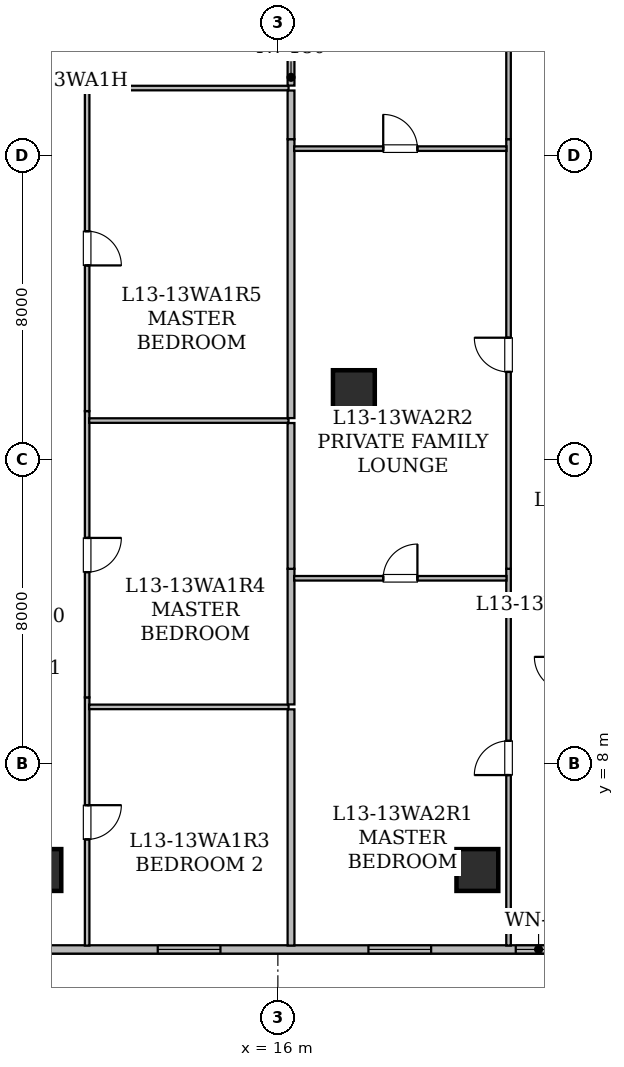
"""IFC4 building model, lengths in metres.
Left out: names, types, materials, properties, quantities, classifications, styles, units other than length and angle.
Written with IfcOpenShell. Run it as: python <this file> out.ifc"""

import sys

from ifc_helpers import new_model, si_unit, direction, frame, frame_2d, origin, origin_2d, place, context, subcontext, project, spatial, rectangle, hollow_rectangle, extrude, element, fill, save


model = new_model("IFC4")
c1 = context("Model", 3, precision=1e-05, world=origin(), true_north=direction((0.0, 1.0)))
c2 = subcontext(c1, "Body", "Model", "MODEL_VIEW")
j1 = project(units=[si_unit("LENGTHUNIT", "METRE"), si_unit("PLANEANGLEUNIT", "RADIAN")], contexts=[c1])
p1 = place(None, origin())
s1 = spatial("IfcSite", under=j1, at=p1, CompositionType="ELEMENT")
p2 = place(p1, origin())
s2 = spatial("IfcBuilding", under=s1, at=p2, CompositionType="ELEMENT")
p3 = place(p2, frame((0.0, 0.0, 55.2)))
s3 = spatial("IfcBuildingStorey", under=s2, at=p3, CompositionType="ELEMENT", Elevation=55.2)
for number, where, z_axis, x_axis in (
    (1, (9.75, 5.2, 0.0), (0.0, 0.0, 1.0), (1.0, 0.0, 0.0)),
    (2, (21.25, 5.2, 0.0), (0.0, 0.0, 1.0), (1.0, 0.0, 0.0)),
    (3, (18.0, 17.8, 0.0), (0.0, 0.0, 1.0), (1.0, 0.0, 0.0)),
):
    element("IfcColumn", number, at=place(p3, frame(where, z_axis=z_axis, x_axis=x_axis)), inside=s3, PredefinedType="COLUMN", context=c2, shape_type="SweptSolid", body=[
        extrude(hollow_rectangle(XDim=1.1, YDim=1.1, WallThickness=0.055, at=origin_2d()), origin(), (0.0, 0.0, 1.0), 3.65),
    ])
p4 = place(p3, frame((45.683, 3.11, 0.0), z_axis=(0.0, 0.0, 1.0), x_axis=(-1.0, 0.0, 0.0)))
e4 = element("IfcWall", 4, at=p4, inside=s3, PredefinedType="STANDARD", context=c2, shape_type="SweptSolid", body=[
    extrude(rectangle(XDim=37.368, YDim=0.22, at=frame_2d((18.684, 0.0))), origin(), (0.0, 0.0, 1.0), 3.43),
])
p5 = place(p4, frame((31.194, 0.0, 0.85)))
e5 = element("IfcOpeningElement", 5, at=p5, cuts=e4, PredefinedType="OPENING", context=c2, shape_type="SweptSolid", body=[
    extrude(rectangle(XDim=1.65, YDim=1.55, at=frame_2d((0.825, 0.775))), frame((0.0, 0.12, 0.0), z_axis=(0.0, -1.0, 0.0), x_axis=(1.0, 0.0, 0.0)), (0.0, 0.0, 1.0), 0.24),
])
p6 = place(p4, frame((19.615, 0.0, 0.85)))
e6 = element("IfcOpeningElement", 6, at=p6, cuts=e4, PredefinedType="OPENING", context=c2, shape_type="SweptSolid", body=[
    extrude(rectangle(XDim=1.65, YDim=1.55, at=frame_2d((0.825, 0.775))), frame((0.0, 0.12, 0.0), z_axis=(0.0, -1.0, 0.0), x_axis=(1.0, 0.0, 0.0)), (0.0, 0.0, 1.0), 0.24),
])
p7 = place(p4, frame((22.223, 0.0, 0.8)))
e7 = element("IfcOpeningElement", 7, at=p7, cuts=e4, PredefinedType="OPENING", context=c2, shape_type="SweptSolid", body=[
    extrude(rectangle(XDim=1.2, YDim=1.5, at=frame_2d((0.6, 0.75))), frame((0.0, 0.12, 0.0), z_axis=(0.0, -1.0, 0.0), x_axis=(1.0, 0.0, 0.0)), (0.0, 0.0, 1.0), 0.24),
])
p8 = place(p4, frame((25.65, 0.0, 0.85)))
e8 = element("IfcOpeningElement", 8, at=p8, cuts=e4, PredefinedType="OPENING", context=c2, shape_type="SweptSolid", body=[
    extrude(rectangle(XDim=1.65, YDim=1.55, at=frame_2d((0.825, 0.775))), frame((0.0, 0.12, 0.0), z_axis=(0.0, -1.0, 0.0), x_axis=(1.0, 0.0, 0.0)), (0.0, 0.0, 1.0), 0.24),
])
p9 = place(p4, frame((10.983, 0.0, 0.8)))
e9 = element("IfcOpeningElement", 9, at=p9, cuts=e4, PredefinedType="OPENING", context=c2, shape_type="SweptSolid", body=[
    extrude(rectangle(XDim=1.2, YDim=1.5, at=frame_2d((0.6, 0.75))), frame((0.0, 0.12, 0.0), z_axis=(0.0, -1.0, 0.0), x_axis=(1.0, 0.0, 0.0)), (0.0, 0.0, 1.0), 0.24),
])
p10 = place(p4, frame((14.783, 0.0, 0.85)))
e10 = element("IfcOpeningElement", 10, at=p10, cuts=e4, PredefinedType="OPENING", context=c2, shape_type="SweptSolid", body=[
    extrude(rectangle(XDim=1.65, YDim=1.55, at=frame_2d((0.825, 0.775))), frame((0.0, 0.12, 0.0), z_axis=(0.0, -1.0, 0.0), x_axis=(1.0, 0.0, 0.0)), (0.0, 0.0, 1.0), 0.24),
])
p11 = place(p4, frame((6.733, 0.0, 0.85)))
e11 = element("IfcOpeningElement", 11, at=p11, cuts=e4, PredefinedType="OPENING", context=c2, shape_type="SweptSolid", body=[
    extrude(rectangle(XDim=1.65, YDim=1.55, at=frame_2d((0.825, 0.775))), frame((0.0, 0.12, 0.0), z_axis=(0.0, -1.0, 0.0), x_axis=(1.0, 0.0, 0.0)), (0.0, 0.0, 1.0), 0.24),
])
p12 = place(p4, frame((1.738, 0.0, 0.85)))
e12 = element("IfcOpeningElement", 12, at=p12, cuts=e4, PredefinedType="OPENING", context=c2, shape_type="SweptSolid", body=[
    extrude(rectangle(XDim=1.65, YDim=1.55, at=frame_2d((0.825, 0.775))), frame((0.0, 0.12, 0.0), z_axis=(0.0, -1.0, 0.0), x_axis=(1.0, 0.0, 0.0)), (0.0, 0.0, 1.0), 0.24),
])
p13 = place(p3, frame((10.981, 9.742, 0.0), z_axis=(0.0, 0.0, 1.0), x_axis=(0.0, -1.0, 0.0)))
e13 = element("IfcWall", 13, at=p13, inside=s3, PredefinedType="PARTITIONING", context=c2, shape_type="SweptSolid", body=[
    extrude(rectangle(XDim=6.53, YDim=0.12, at=frame_2d((3.265, 0.0))), origin(), (0.0, 0.0, 1.0), 2.647),
])
p14 = place(p13, frame((2.836, 0.0, 0.0)))
e14 = element("IfcOpeningElement", 14, at=p14, cuts=e13, PredefinedType="OPENING", context=c2, shape_type="SweptSolid", body=[
    extrude(rectangle(XDim=0.9, YDim=2.1, at=frame_2d((0.45, 1.05))), frame((0.0, 0.07, 0.0), z_axis=(0.0, -1.0, 0.0), x_axis=(1.0, 0.0, 0.0)), (0.0, 0.0, 1.0), 0.14),
])
p15 = place(p3, frame((10.981, 17.275, 0.0), z_axis=(0.0, 0.0, 1.0), x_axis=(0.0, -1.0, 0.0)))
e15 = element("IfcWall", 15, at=p15, inside=s3, PredefinedType="PARTITIONING", context=c2, shape_type="SweptSolid", body=[
    extrude(rectangle(XDim=7.533, YDim=0.12, at=frame_2d((3.767, 0.0))), origin(), (0.0, 0.0, 1.0), 2.647),
])
p16 = place(p15, frame((3.337, 0.0, 0.0)))
e16 = element("IfcOpeningElement", 16, at=p16, cuts=e15, PredefinedType="OPENING", context=c2, shape_type="SweptSolid", body=[
    extrude(rectangle(XDim=0.9, YDim=2.1, at=frame_2d((0.45, 1.05))), frame((0.0, 0.07, 0.0), z_axis=(0.0, -1.0, 0.0), x_axis=(1.0, 0.0, 0.0)), (0.0, 0.0, 1.0), 0.14),
])
p17 = place(p3, frame((16.281, 25.775, 0.0), z_axis=(0.0, 0.0, 1.0), x_axis=(-1.0, 0.0, 0.0)))
e17 = element("IfcWall", 17, at=p17, inside=s3, PredefinedType="PARTITIONING", context=c2, shape_type="SweptSolid", body=[
    extrude(rectangle(XDim=5.365, YDim=0.12, at=frame_2d((2.683, 0.0))), origin(), (0.0, 0.0, 1.0), 3.43),
])
p18 = place(p3, frame((10.981, 25.84, 0.0), z_axis=(0.0, 0.0, 1.0), x_axis=(0.0, -1.0, 0.0)))
e18 = element("IfcWall", 18, at=p18, inside=s3, PredefinedType="PARTITIONING", context=c2, shape_type="SweptSolid", body=[
    extrude(rectangle(XDim=8.565, YDim=0.12, at=frame_2d((4.283, 0.0))), origin(), (0.0, 0.0, 1.0), 2.647),
])
p19 = place(p18, frame((3.832, 0.0, 0.0)))
e19 = element("IfcOpeningElement", 19, at=p19, cuts=e18, PredefinedType="OPENING", context=c2, shape_type="SweptSolid", body=[
    extrude(rectangle(XDim=0.9, YDim=2.1, at=frame_2d((0.45, 1.05))), frame((0.0, 0.07, 0.0), z_axis=(0.0, -1.0, 0.0), x_axis=(1.0, 0.0, 0.0)), (0.0, 0.0, 1.0), 0.14),
])
p20 = place(p3, frame((16.346, 27.29, 0.0), z_axis=(0.0, 0.0, 1.0), x_axis=(0.0, -1.0, 0.0)))
e20 = element("IfcWall", 20, at=p20, inside=s3, PredefinedType="STANDARD", context=c2, shape_type="SweptSolid", body=[
    extrude(rectangle(XDim=1.45, YDim=0.18, at=frame_2d((0.725, 0.0))), origin(), (0.0, 0.0, 1.0), 3.43),
])
p21 = place(p3, frame((11.035, 9.492, 0.0), z_axis=(0.0, 0.0, 1.0), x_axis=(1.0, 0.0, 0.0)))
e21 = element("IfcWall", 21, at=p21, inside=s3, PredefinedType="PARTITIONING", context=c2, shape_type="SweptSolid", body=[
    extrude(rectangle(XDim=5.246, YDim=0.12, at=frame_2d((2.623, 0.0))), origin(), (0.0, 0.0, 1.0), 2.647),
])
p22 = place(p3, frame((16.346, 9.427, 0.0), z_axis=(0.0, 0.0, 1.0), x_axis=(0.0, -1.0, 0.0)))
e22 = element("IfcWall", 22, at=p22, inside=s3, PredefinedType="STANDARD", context=c2, shape_type="SweptSolid", body=[
    extrude(rectangle(XDim=6.215, YDim=0.18, at=frame_2d((3.107, 0.0))), origin(), (0.0, 0.0, 1.0), 2.803),
])
p23 = place(p3, frame((11.035, 17.026, 0.0), z_axis=(0.0, 0.0, 1.0), x_axis=(1.0, 0.0, 0.0)))
e23 = element("IfcWall", 23, at=p23, inside=s3, PredefinedType="PARTITIONING", context=c2, shape_type="SweptSolid", body=[
    extrude(rectangle(XDim=5.246, YDim=0.12, at=frame_2d((2.623, 0.0))), origin(), (0.0, 0.0, 1.0), 2.647),
])
p24 = place(p3, frame((16.346, 13.125, 0.0), z_axis=(0.0, 0.0, 1.0), x_axis=(0.0, -1.0, 0.0)))
e24 = element("IfcWall", 24, at=p24, inside=s3, PredefinedType="STANDARD", context=c2, shape_type="SweptSolid", body=[
    extrude(rectangle(XDim=3.568, YDim=0.18, at=frame_2d((1.784, 0.0))), origin(), (0.0, 0.0, 1.0), 3.43),
])
p25 = place(p3, frame((16.346, 16.961, 0.0), z_axis=(0.0, 0.0, 1.0), x_axis=(0.0, -1.0, 0.0)))
e25 = element("IfcWall", 25, at=p25, inside=s3, PredefinedType="STANDARD", context=c2, shape_type="SweptSolid", body=[
    extrude(rectangle(XDim=3.836, YDim=0.18, at=frame_2d((1.918, 0.0))), origin(), (0.0, 0.0, 1.0), 2.647),
])
p26 = place(p3, frame((16.346, 24.43, 0.0), z_axis=(0.0, 0.0, 1.0), x_axis=(0.0, -1.0, 0.0)))
e26 = element("IfcWall", 26, at=p26, inside=s3, PredefinedType="STANDARD", context=c2, shape_type="SweptSolid", body=[
    extrude(rectangle(XDim=7.339, YDim=0.18, at=frame_2d((3.669, 0.0))), origin(), (0.0, 0.0, 1.0), 2.647),
])
p27 = place(p3, frame((16.346, 25.71, 0.0), z_axis=(0.0, 0.0, 1.0), x_axis=(0.0, -1.0, 0.0)))
e27 = element("IfcWall", 27, at=p27, inside=s3, PredefinedType="STANDARD", context=c2, shape_type="SweptSolid", body=[
    extrude(rectangle(XDim=1.28, YDim=0.18, at=frame_2d((0.64, 0.0))), origin(), (0.0, 0.0, 1.0), 2.957),
])
p28 = place(p3, frame((22.07, 3.212, 0.0), z_axis=(0.0, 0.0, 1.0), x_axis=(0.0, 1.0, 0.0)))
e28 = element("IfcWall", 28, at=p28, inside=s3, PredefinedType="PARTITIONING", context=c2, shape_type="SweptSolid", body=[
    extrude(rectangle(XDim=9.913, YDim=0.12, at=frame_2d((4.957, 0.0))), origin(), (0.0, 0.0, 1.0), 2.803),
])
p29 = place(p28, frame((4.486, 0.0, 0.0)))
e29 = element("IfcOpeningElement", 29, at=p29, cuts=e28, PredefinedType="OPENING", context=c2, shape_type="SweptSolid", body=[
    extrude(rectangle(XDim=0.9, YDim=2.1, at=frame_2d((0.45, 1.05))), frame((0.0, 0.07, 0.0), z_axis=(0.0, -1.0, 0.0), x_axis=(1.0, 0.0, 0.0)), (0.0, 0.0, 1.0), 0.14),
])
p30 = place(p3, frame((22.07, 13.125, 0.0), z_axis=(0.0, 0.0, 1.0), x_axis=(0.0, 1.0, 0.0)))
e30 = element("IfcWall", 30, at=p30, inside=s3, PredefinedType="PARTITIONING", context=c2, shape_type="SweptSolid", body=[
    extrude(rectangle(XDim=11.305, YDim=0.12, at=frame_2d((5.652, 0.0))), origin(), (0.0, 0.0, 1.0), 2.647),
])
p31 = place(p30, frame((5.181, 0.0, 0.0)))
e31 = element("IfcOpeningElement", 31, at=p31, cuts=e30, PredefinedType="OPENING", context=c2, shape_type="SweptSolid", body=[
    extrude(rectangle(XDim=0.9, YDim=2.1, at=frame_2d((0.45, 1.05))), frame((0.0, 0.07, 0.0), z_axis=(0.0, -1.0, 0.0), x_axis=(1.0, 0.0, 0.0)), (0.0, 0.0, 1.0), 0.14),
])
p32 = place(p3, frame((22.07, 24.43, 0.0), z_axis=(0.0, 0.0, 1.0), x_axis=(0.0, 1.0, 0.0)))
e32 = element("IfcWall", 32, at=p32, inside=s3, PredefinedType="PARTITIONING", context=c2, shape_type="SweptSolid", body=[
    extrude(rectangle(XDim=6.438, YDim=0.12, at=frame_2d((3.219, 0.0))), origin(), (0.0, 0.0, 1.0), 2.957),
])
p33 = place(p32, frame((2.769, 0.0, 0.0)))
e33 = element("IfcOpeningElement", 33, at=p33, cuts=e32, PredefinedType="OPENING", context=c2, shape_type="SweptSolid", body=[
    extrude(rectangle(XDim=0.9, YDim=2.1, at=frame_2d((0.45, 1.05))), frame((0.0, 0.07, 0.0), z_axis=(0.0, -1.0, 0.0), x_axis=(1.0, 0.0, 0.0)), (0.0, 0.0, 1.0), 0.14),
])
p34 = place(p3, frame((16.428, 12.876, 0.0), z_axis=(0.0, 0.0, 1.0), x_axis=(1.0, 0.0, 0.0)))
e34 = element("IfcWall", 34, at=p34, inside=s3, PredefinedType="PARTITIONING", context=c2, shape_type="SweptSolid", body=[
    extrude(rectangle(XDim=5.588, YDim=0.12, at=frame_2d((2.794, 0.0))), origin(), (0.0, 0.0, 1.0), 2.647),
])
p35 = place(p34, frame((2.344, 0.0, 0.0)))
e35 = element("IfcOpeningElement", 35, at=p35, cuts=e34, PredefinedType="OPENING", context=c2, shape_type="SweptSolid", body=[
    extrude(rectangle(XDim=0.9, YDim=2.1, at=frame_2d((0.45, 1.05))), frame((0.0, 0.07, 0.0), z_axis=(0.0, -1.0, 0.0), x_axis=(1.0, 0.0, 0.0)), (0.0, 0.0, 1.0), 0.14),
])
p36 = place(p3, frame((16.428, 24.181, 0.0), z_axis=(0.0, 0.0, 1.0), x_axis=(1.0, 0.0, 0.0)))
e36 = element("IfcWall", 36, at=p36, inside=s3, PredefinedType="PARTITIONING", context=c2, shape_type="SweptSolid", body=[
    extrude(rectangle(XDim=5.588, YDim=0.12, at=frame_2d((2.794, 0.0))), origin(), (0.0, 0.0, 1.0), 2.647),
])
p37 = place(p36, frame((2.344, 0.0, 0.0)))
e37 = element("IfcOpeningElement", 37, at=p37, cuts=e36, PredefinedType="OPENING", context=c2, shape_type="SweptSolid", body=[
    extrude(rectangle(XDim=0.9, YDim=2.1, at=frame_2d((0.45, 1.05))), frame((0.0, 0.07, 0.0), z_axis=(0.0, -1.0, 0.0), x_axis=(1.0, 0.0, 0.0)), (0.0, 0.0, 1.0), 0.14),
])
p38 = place(p5, origin())
e38 = element("IfcWindow", 38, at=p38, inside=s3, PartitioningType="SINGLE_PANEL", PredefinedType="WINDOW", context=c2, shape_type="SweptSolid", body=[
    extrude(rectangle(XDim=1.65, YDim=1.55, at=frame_2d((0.825, 0.775))), frame((0.0, 0.03, 0.0), z_axis=(0.0, -1.0, 0.0), x_axis=(1.0, 0.0, 0.0)), (0.0, 0.0, 1.0), 0.06),
])
fill(e5, e38)
p39 = place(p7, origin())
e39 = element("IfcWindow", 39, at=p39, inside=s3, PartitioningType="SINGLE_PANEL", PredefinedType="WINDOW", context=c2, shape_type="SweptSolid", body=[
    extrude(rectangle(XDim=1.2, YDim=1.5, at=frame_2d((0.6, 0.75))), frame((0.0, 0.03, 0.0), z_axis=(0.0, -1.0, 0.0), x_axis=(1.0, 0.0, 0.0)), (0.0, 0.0, 1.0), 0.06),
])
fill(e7, e39)
p40 = place(p8, origin())
e40 = element("IfcWindow", 40, at=p40, inside=s3, PartitioningType="SINGLE_PANEL", PredefinedType="WINDOW", context=c2, shape_type="SweptSolid", body=[
    extrude(rectangle(XDim=1.65, YDim=1.55, at=frame_2d((0.825, 0.775))), frame((0.0, 0.03, 0.0), z_axis=(0.0, -1.0, 0.0), x_axis=(1.0, 0.0, 0.0)), (0.0, 0.0, 1.0), 0.06),
])
fill(e8, e40)
p41 = place(p14, origin())
e41 = element("IfcDoor", 41, at=p41, inside=s3, OperationType="SINGLE_SWING_LEFT", PredefinedType="DOOR", context=c2, shape_type="SweptSolid", body=[
    extrude(rectangle(XDim=0.9, YDim=2.1, at=frame_2d((0.45, 1.05))), frame((0.0, 0.025, 0.0), z_axis=(0.0, -1.0, 0.0), x_axis=(1.0, 0.0, 0.0)), (0.0, 0.0, 1.0), 0.05),
])
fill(e14, e41)
p42 = place(p16, origin())
e42 = element("IfcDoor", 42, at=p42, inside=s3, OperationType="SINGLE_SWING_LEFT", PredefinedType="DOOR", context=c2, shape_type="SweptSolid", body=[
    extrude(rectangle(XDim=0.9, YDim=2.1, at=frame_2d((0.45, 1.05))), frame((0.0, 0.025, 0.0), z_axis=(0.0, -1.0, 0.0), x_axis=(1.0, 0.0, 0.0)), (0.0, 0.0, 1.0), 0.05),
])
fill(e16, e42)
p43 = place(p19, origin())
e43 = element("IfcDoor", 43, at=p43, inside=s3, OperationType="SINGLE_SWING_RIGHT", PredefinedType="DOOR", context=c2, shape_type="SweptSolid", body=[
    extrude(rectangle(XDim=0.9, YDim=2.1, at=frame_2d((0.45, 1.05))), frame((0.0, 0.025, 0.0), z_axis=(0.0, -1.0, 0.0), x_axis=(1.0, 0.0, 0.0)), (0.0, 0.0, 1.0), 0.05),
])
fill(e19, e43)
p44 = place(p29, origin())
e44 = element("IfcDoor", 44, at=p44, inside=s3, OperationType="SINGLE_SWING_LEFT", PredefinedType="DOOR", context=c2, shape_type="SweptSolid", body=[
    extrude(rectangle(XDim=0.9, YDim=2.1, at=frame_2d((0.45, 1.05))), frame((0.0, 0.025, 0.0), z_axis=(0.0, -1.0, 0.0), x_axis=(1.0, 0.0, 0.0)), (0.0, 0.0, 1.0), 0.05),
])
fill(e29, e44)
p45 = place(p31, origin())
e45 = element("IfcDoor", 45, at=p45, inside=s3, OperationType="SINGLE_SWING_RIGHT", PredefinedType="DOOR", context=c2, shape_type="SweptSolid", body=[
    extrude(rectangle(XDim=0.9, YDim=2.1, at=frame_2d((0.45, 1.05))), frame((0.0, 0.025, 0.0), z_axis=(0.0, -1.0, 0.0), x_axis=(1.0, 0.0, 0.0)), (0.0, 0.0, 1.0), 0.05),
])
fill(e31, e45)
p46 = place(p35, origin())
e46 = element("IfcDoor", 46, at=p46, inside=s3, OperationType="SINGLE_SWING_RIGHT", PredefinedType="DOOR", context=c2, shape_type="SweptSolid", body=[
    extrude(rectangle(XDim=0.9, YDim=2.1, at=frame_2d((0.45, 1.05))), frame((0.0, 0.025, 0.0), z_axis=(0.0, -1.0, 0.0), x_axis=(1.0, 0.0, 0.0)), (0.0, 0.0, 1.0), 0.05),
])
fill(e35, e46)
p47 = place(p37, origin())
e47 = element("IfcDoor", 47, at=p47, inside=s3, OperationType="SINGLE_SWING_LEFT", PredefinedType="DOOR", context=c2, shape_type="SweptSolid", body=[
    extrude(rectangle(XDim=0.9, YDim=2.1, at=frame_2d((0.45, 1.05))), frame((0.0, 0.025, 0.0), z_axis=(0.0, -1.0, 0.0), x_axis=(1.0, 0.0, 0.0)), (0.0, 0.0, 1.0), 0.05),
])
fill(e37, e47)
save(model, sys.argv[1])
